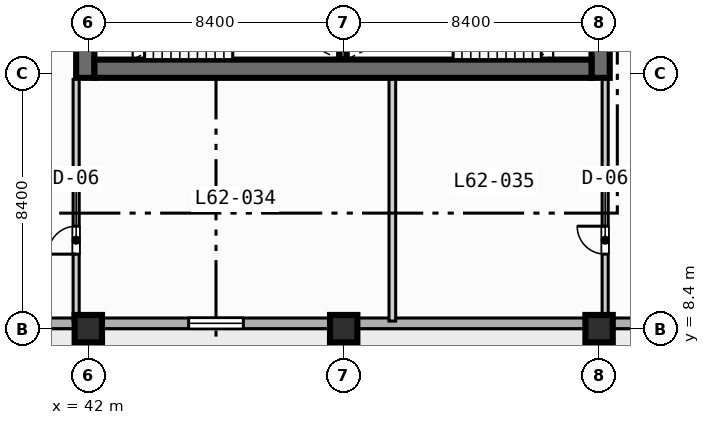
"""IFC4 building model, lengths in metres.
Left out: names, types, materials, properties, quantities, classifications, styles, units other than length and angle.
Written with IfcOpenShell. Run it as: python <this file> out.ifc"""

import sys

from ifc_helpers import new_model, si_unit, direction, frame, frame_2d, origin, origin_2d, place, context, subcontext, project, spatial, rectangle, extrude, element, fill, save


model = new_model("IFC4")
c1 = context("Model", 3, precision=1e-05, world=origin(), true_north=direction((0.0, 1.0)))
c2 = subcontext(c1, "Body", "Model", "MODEL_VIEW")
j1 = project(units=[si_unit("LENGTHUNIT", "METRE"), si_unit("PLANEANGLEUNIT", "RADIAN")], contexts=[c1])
p1 = place(None, origin())
s1 = spatial("IfcSite", under=j1, at=p1, CompositionType="ELEMENT")
p2 = place(p1, origin())
s2 = spatial("IfcBuilding", under=s1, at=p2, CompositionType="ELEMENT")
p3 = place(p2, frame((0.0, 0.0, 252.7)))
s3 = spatial("IfcBuildingStorey", under=s2, at=p3, CompositionType="ELEMENT", Elevation=252.7)
p4 = place(p3, frame((50.375, 17.25, 0.0), z_axis=(0.0, 0.0, 1.0), x_axis=(0.0, 1.0, 0.0)))
e1 = element("IfcWall", 1, at=p4, inside=s3, PredefinedType="SOLIDWALL", context=c2, shape_type="SweptSolid", body=[
    extrude(rectangle(XDim=3.5, YDim=0.25, at=frame_2d((1.75, 0.0))), origin(), (0.0, 0.0, 1.0), 3.47),
])
for number, where, z_axis, x_axis in (
    (2, (41.9, 16.65, 0.0), (0.0, 0.0, 1.0), (0.0, 1.0, 0.0)),
    (3, (58.85, 16.65, 0.0), (0.0, 0.0, 1.0), (0.0, 1.0, 0.0)),
):
    element("IfcWall", number, at=place(p3, frame(where, z_axis=z_axis, x_axis=x_axis)), inside=s3, PredefinedType="SHEAR", context=c2, shape_type="SweptSolid", body=[
        extrude(rectangle(XDim=1.35, YDim=0.6, at=frame_2d((0.675, 0.0))), origin(), (0.0, 0.0, 1.0), 3.47),
    ])
p5 = place(p3, frame((42.2, 16.95, 0.0), z_axis=(0.0, 0.0, 1.0), x_axis=(1.0, 0.0, 0.0)))
e4 = element("IfcWall", 4, at=p5, inside=s3, PredefinedType="SHEAR", context=c2, shape_type="SweptSolid", body=[
    extrude(rectangle(XDim=16.35, YDim=0.6, at=frame_2d((8.175, 0.0))), origin(), (0.0, 0.0, 1.0), 3.47),
])
for number, where, z_axis, x_axis in (
    (5, (42.0, 8.4, 0.0), (0.0, 0.0, 1.0), (1.0, 0.0, 0.0)),
    (6, (50.4, 8.4, 0.0), (0.0, 0.0, 1.0), (1.0, 0.0, 0.0)),
    (7, (58.8, 8.4, 0.0), (0.0, 0.0, 1.0), (1.0, 0.0, 0.0)),
):
    element("IfcColumn", number, at=place(p3, frame(where, z_axis=z_axis, x_axis=x_axis)), inside=s3, PredefinedType="COLUMN", context=c2, shape_type="SweptSolid", body=[
        extrude(rectangle(XDim=0.9, YDim=0.9, at=origin_2d()), origin(), (0.0, 0.0, 1.0), 3.7),
    ])
p6 = place(p3, frame((72.425, 8.575, 0.0), z_axis=(0.0, 0.0, 1.0), x_axis=(-1.0, 0.0, 0.0)))
e8 = element("IfcWall", 8, at=p6, inside=s3, PredefinedType="STANDARD", context=c2, shape_type="SweptSolid", body=[
    extrude(rectangle(XDim=60.85, YDim=0.35, at=frame_2d((30.425, 0.0))), origin(), (0.0, 0.0, 1.0), 3.47),
])
p7 = place(p6, frame((42.325, 0.0, 0.0)))
e9 = element("IfcOpeningElement", 9, at=p7, cuts=e8, PredefinedType="OPENING", context=c2, shape_type="SweptSolid", body=[
    extrude(rectangle(XDim=1.4, YDim=2.2, at=frame_2d((0.7, 1.1))), frame((0.0, 0.185, 0.0), z_axis=(0.0, -1.0, 0.0), x_axis=(1.0, 0.0, 0.0)), (0.0, 0.0, 1.0), 0.37),
])
p8 = place(p6, frame((50.225, 0.0, 0.85)))
e10 = element("IfcOpeningElement", 10, at=p8, cuts=e8, PredefinedType="OPENING", context=c2, shape_type="SweptSolid", body=[
    extrude(rectangle(XDim=2.4, YDim=1.95, at=frame_2d((1.2, 0.975))), frame((0.0, 0.185, 0.0), z_axis=(0.0, -1.0, 0.0), x_axis=(1.0, 0.0, 0.0)), (0.0, 0.0, 1.0), 0.37),
])
p9 = place(p6, frame((33.425, 0.0, 0.85)))
e11 = element("IfcOpeningElement", 11, at=p9, cuts=e8, PredefinedType="OPENING", context=c2, shape_type="SweptSolid", body=[
    extrude(rectangle(XDim=2.4, YDim=1.95, at=frame_2d((1.2, 0.975))), frame((0.0, 0.185, 0.0), z_axis=(0.0, -1.0, 0.0), x_axis=(1.0, 0.0, 0.0)), (0.0, 0.0, 1.0), 0.37),
])
p10 = place(p6, frame((25.325, 0.0, 0.85)))
e12 = element("IfcOpeningElement", 12, at=p10, cuts=e8, PredefinedType="OPENING", context=c2, shape_type="SweptSolid", body=[
    extrude(rectangle(XDim=1.8, YDim=1.8, at=frame_2d((0.9, 0.9))), frame((0.0, 0.185, 0.0), z_axis=(0.0, -1.0, 0.0), x_axis=(1.0, 0.0, 0.0)), (0.0, 0.0, 1.0), 0.37),
])
p11 = place(p6, frame((58.675, 0.0, 0.85)))
e13 = element("IfcOpeningElement", 13, at=p11, cuts=e8, PredefinedType="OPENING", context=c2, shape_type="SweptSolid", body=[
    extrude(rectangle(XDim=1.8, YDim=1.8, at=frame_2d((0.9, 0.9))), frame((0.0, 0.185, 0.0), z_axis=(0.0, -1.0, 0.0), x_axis=(1.0, 0.0, 0.0)), (0.0, 0.0, 1.0), 0.37),
])
p12 = place(p3, frame((41.6, 8.65, 0.0), z_axis=(0.0, 0.0, 1.0), x_axis=(0.0, 1.0, 0.0)))
e14 = element("IfcWall", 14, at=p12, inside=s3, PredefinedType="PARTITIONING", context=c2, shape_type="SweptSolid", body=[
    extrude(rectangle(XDim=7.95, YDim=0.2, at=frame_2d((3.975, 0.0))), origin(), (0.0, 0.0, 1.0), 3.47),
])
p13 = place(p12, frame((2.2, 0.0, 0.0)))
e15 = element("IfcOpeningElement", 15, at=p13, cuts=e14, PredefinedType="OPENING", context=c2, shape_type="SweptSolid", body=[
    extrude(rectangle(XDim=0.92, YDim=2.1, at=frame_2d((0.46, 1.05))), frame((0.0, 0.11, 0.0), z_axis=(0.0, -1.0, 0.0), x_axis=(1.0, 0.0, 0.0)), (0.0, 0.0, 1.0), 0.22),
])
p14 = place(p3, frame((59.0, 8.65, 0.0), z_axis=(0.0, 0.0, 1.0), x_axis=(0.0, 1.0, 0.0)))
e16 = element("IfcWall", 16, at=p14, inside=s3, PredefinedType="PARTITIONING", context=c2, shape_type="SweptSolid", body=[
    extrude(rectangle(XDim=7.95, YDim=0.2, at=frame_2d((3.975, 0.0))), origin(), (0.0, 0.0, 1.0), 2.859),
])
p15 = place(p14, frame((2.2, 0.0, 0.0)))
e17 = element("IfcOpeningElement", 17, at=p15, cuts=e16, PredefinedType="OPENING", context=c2, shape_type="SweptSolid", body=[
    extrude(rectangle(XDim=0.92, YDim=2.1, at=frame_2d((0.46, 1.05))), frame((0.0, 0.11, 0.0), z_axis=(0.0, -1.0, 0.0), x_axis=(1.0, 0.0, 0.0)), (0.0, 0.0, 1.0), 0.22),
])
p16 = place(p3, frame((52.0, 8.65, 0.0), z_axis=(0.0, 0.0, 1.0), x_axis=(0.0, 1.0, 0.0)))
e18 = element("IfcWall", 18, at=p16, inside=s3, PredefinedType="PARTITIONING", context=c2, shape_type="SweptSolid", body=[
    extrude(rectangle(XDim=7.95, YDim=0.22, at=frame_2d((3.975, 0.0))), origin(), (0.0, 0.0, 1.0), 3.47),
])
p17 = place(p10, origin())
e19 = element("IfcWindow", 19, at=p17, inside=s3, PartitioningType="SINGLE_PANEL", PredefinedType="WINDOW", context=c2, shape_type="SweptSolid", body=[
    extrude(rectangle(XDim=1.8, YDim=1.8, at=frame_2d((0.9, 0.9))), frame((0.0, 0.03, 0.0), z_axis=(0.0, -1.0, 0.0), x_axis=(1.0, 0.0, 0.0)), (0.0, 0.0, 1.0), 0.06),
])
fill(e12, e19)
p18 = place(p13, origin())
e20 = element("IfcDoor", 20, at=p18, inside=s3, OperationType="SINGLE_SWING_LEFT", PredefinedType="DOOR", context=c2, shape_type="SweptSolid", body=[
    extrude(rectangle(XDim=0.92, YDim=2.1, at=frame_2d((0.46, 1.05))), frame((0.0, 0.025, 0.0), z_axis=(0.0, -1.0, 0.0), x_axis=(1.0, 0.0, 0.0)), (0.0, 0.0, 1.0), 0.05),
])
fill(e15, e20)
p19 = place(p15, origin())
e21 = element("IfcDoor", 21, at=p19, inside=s3, OperationType="SINGLE_SWING_RIGHT", PredefinedType="DOOR", context=c2, shape_type="SweptSolid", body=[
    extrude(rectangle(XDim=0.92, YDim=2.1, at=frame_2d((0.46, 1.05))), frame((0.0, 0.025, 0.0), z_axis=(0.0, -1.0, 0.0), x_axis=(1.0, 0.0, 0.0)), (0.0, 0.0, 1.0), 0.05),
])
fill(e17, e21)
save(model, sys.argv[1])
